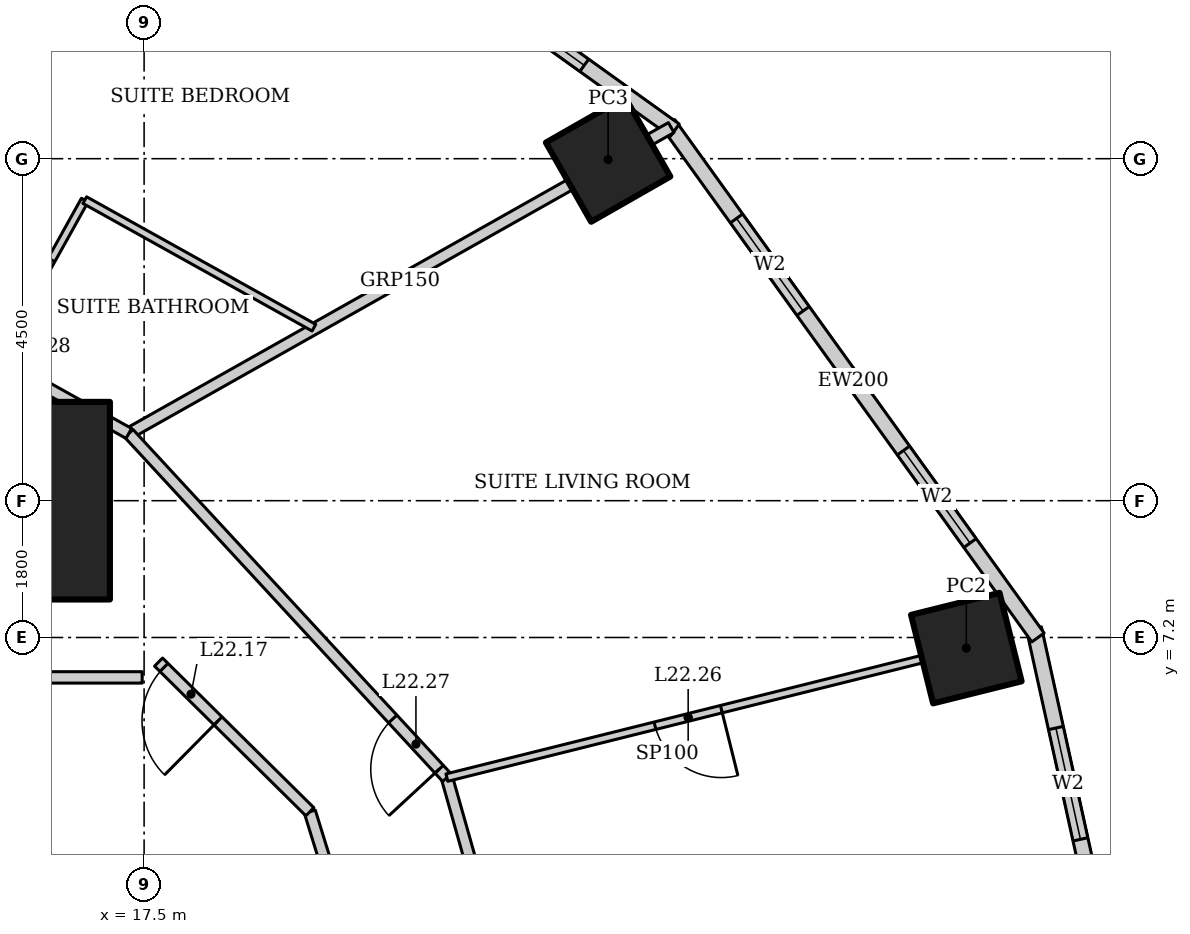
"""IFC4 building model, lengths in metres.
Left out: names, types, materials, properties, quantities, classifications, styles, units other than length and angle.
Written with IfcOpenShell. Run it as: python <this file> out.ifc"""

import sys

from ifc_helpers import new_model, si_unit, direction, frame, frame_2d, origin, origin_2d, place, context, subcontext, project, spatial, rectangle, hollow_rectangle, extrude, element, fill, save


model = new_model("IFC4")
c1 = context("Model", 3, precision=1e-05, world=origin(), true_north=direction((0.0, 1.0)))
c2 = subcontext(c1, "Body", "Model", "MODEL_VIEW")
j1 = project(units=[si_unit("LENGTHUNIT", "METRE"), si_unit("PLANEANGLEUNIT", "RADIAN")], contexts=[c1])
p1 = place(None, origin())
s1 = spatial("IfcSite", under=j1, at=p1, CompositionType="ELEMENT")
p2 = place(p1, origin())
s2 = spatial("IfcBuilding", under=s1, at=p2, CompositionType="ELEMENT")
p3 = place(p2, frame((0.0, 0.0, 94.6)))
s3 = spatial("IfcBuildingStorey", under=s2, at=p3, CompositionType="ELEMENT", Elevation=94.6)
p4 = place(p3, frame((15.75, 9.0, 0.0), z_axis=(0.0, 0.0, 1.0), x_axis=(1.0, 0.0, 0.0)))
e1 = element("IfcColumn", 1, at=p4, inside=s3, PredefinedType="COLUMN", context=c2, shape_type="SweptSolid", body=[
    extrude(hollow_rectangle(XDim=2.6, YDim=2.6, WallThickness=0.13, at=origin_2d()), origin(), (0.0, 0.0, 1.0), 3.6),
])
p5 = place(p3, frame((28.318, 7.06, 0.0), z_axis=(0.0, 0.0, 1.0), x_axis=(0.970295726276, 0.2419218956, 0.0)))
e2 = element("IfcColumn", 2, at=p5, inside=s3, PredefinedType="COLUMN", context=c2, shape_type="SweptSolid", body=[
    extrude(hollow_rectangle(XDim=1.2, YDim=1.2, WallThickness=0.1, at=origin_2d()), origin(), (0.0, 0.0, 1.0), 3.6),
])
p6 = place(p3, frame((23.605, 13.489, 0.0), z_axis=(0.0, 0.0, 1.0), x_axis=(0.86824298017, 0.496139221777, 0.0)))
e3 = element("IfcColumn", 3, at=p6, inside=s3, PredefinedType="COLUMN", context=c2, shape_type="SweptSolid", body=[
    extrude(hollow_rectangle(XDim=1.2, YDim=1.2, WallThickness=0.12, at=origin_2d()), origin(), (0.0, 0.0, 1.0), 3.6),
])
p7 = place(p3, frame((30.835, -0.067, 0.0), z_axis=(0.0, 0.0, 1.0), x_axis=(-0.215238065514, 0.976561608478, 0.0)))
e4 = element("IfcWall", 4, at=p7, inside=s3, PredefinedType="SOLIDWALL", context=c2, shape_type="SweptSolid", body=[
    extrude(rectangle(XDim=7.562, YDim=0.2, at=frame_2d((3.781, 0.0))), origin(), (0.0, 0.0, 1.0), 3.45),
])
p8 = place(p7, frame((1.341, 0.0, 0.5)))
e5 = element("IfcOpeningElement", 5, at=p8, cuts=e4, PredefinedType="OPENING", context=c2, shape_type="SweptSolid", body=[
    extrude(rectangle(XDim=1.5, YDim=2.2, at=frame_2d((0.75, 1.1))), frame((0.0, 0.11, 0.0), z_axis=(0.0, -1.0, 0.0), x_axis=(1.0, 0.0, 0.0)), (0.0, 0.0, 1.0), 0.22),
])
p9 = place(p7, frame((4.722, 0.0, 0.5)))
e6 = element("IfcOpeningElement", 6, at=p9, cuts=e4, PredefinedType="OPENING", context=c2, shape_type="SweptSolid", body=[
    extrude(rectangle(XDim=1.5, YDim=2.2, at=frame_2d((0.75, 1.1))), frame((0.0, 0.11, 0.0), z_axis=(0.0, -1.0, 0.0), x_axis=(1.0, 0.0, 0.0)), (0.0, 0.0, 1.0), 0.22),
])
p10 = place(p3, frame((29.26, 7.2, 0.0), z_axis=(0.0, 0.0, 1.0), x_axis=(-0.583937613703, 0.811798536155, 0.0)))
e7 = element("IfcWall", 7, at=p10, inside=s3, PredefinedType="SOLIDWALL", context=c2, shape_type="SweptSolid", body=[
    extrude(rectangle(XDim=8.323, YDim=0.2, at=frame_2d((4.162, 0.0))), origin(), (0.0, 0.0, 1.0), 3.45),
])
p11 = place(p10, frame((1.531, 0.0, 0.5)))
e8 = element("IfcOpeningElement", 8, at=p11, cuts=e7, PredefinedType="OPENING", context=c2, shape_type="SweptSolid", body=[
    extrude(rectangle(XDim=1.5, YDim=2.2, at=frame_2d((0.75, 1.1))), frame((0.0, 0.11, 0.0), z_axis=(0.0, -1.0, 0.0), x_axis=(1.0, 0.0, 0.0)), (0.0, 0.0, 1.0), 0.22),
])
p12 = place(p10, frame((5.292, 0.0, 0.5)))
e9 = element("IfcOpeningElement", 9, at=p12, cuts=e7, PredefinedType="OPENING", context=c2, shape_type="SweptSolid", body=[
    extrude(rectangle(XDim=1.5, YDim=2.2, at=frame_2d((0.75, 1.1))), frame((0.0, 0.11, 0.0), z_axis=(0.0, -1.0, 0.0), x_axis=(1.0, 0.0, 0.0)), (0.0, 0.0, 1.0), 0.22),
])
p13 = place(p3, frame((24.482, 13.875, 0.0), z_axis=(0.0, 0.0, 1.0), x_axis=(-0.812791321576, 0.582554948112, 0.0)))
e10 = element("IfcWall", 10, at=p13, inside=s3, PredefinedType="SOLIDWALL", context=c2, shape_type="SweptSolid", body=[
    extrude(rectangle(XDim=8.063, YDim=0.2, at=frame_2d((4.032, 0.0))), origin(), (0.0, 0.0, 1.0), 3.45),
])
p14 = place(p13, frame((1.466, 0.0, 0.5)))
e11 = element("IfcOpeningElement", 11, at=p14, cuts=e10, PredefinedType="OPENING", context=c2, shape_type="SweptSolid", body=[
    extrude(rectangle(XDim=1.5, YDim=2.2, at=frame_2d((0.75, 1.1))), frame((0.0, 0.11, 0.0), z_axis=(0.0, -1.0, 0.0), x_axis=(1.0, 0.0, 0.0)), (0.0, 0.0, 1.0), 0.22),
])
p15 = place(p13, frame((5.097, 0.0, 0.5)))
e12 = element("IfcOpeningElement", 12, at=p15, cuts=e10, PredefinedType="OPENING", context=c2, shape_type="SweptSolid", body=[
    extrude(rectangle(XDim=1.5, YDim=2.2, at=frame_2d((0.75, 1.1))), frame((0.0, 0.11, 0.0), z_axis=(0.0, -1.0, 0.0), x_axis=(1.0, 0.0, 0.0)), (0.0, 0.0, 1.0), 0.22),
])
p16 = place(p3, frame((24.435, 13.909, 0.0), z_axis=(0.0, 0.0, 1.0), x_axis=(-0.871075246657, -0.491149584813, 0.0)))
e13 = element("IfcWall", 13, at=p16, inside=s3, PredefinedType="PARTITIONING", context=c2, shape_type="SweptSolid", body=[
    extrude(rectangle(XDim=8.192, YDim=0.15, at=frame_2d((4.096, 0.0))), origin(), (0.0, 0.0, 1.0), 2.693),
])
p17 = place(p3, frame((23.0, 0.0, 0.0), z_axis=(0.0, 0.0, 1.0), x_axis=(-0.272386051236, 0.962188047677, 0.0)))
e14 = element("IfcWall", 14, at=p17, inside=s3, PredefinedType="PARTITIONING", context=c2, shape_type="SweptSolid", body=[
    extrude(rectangle(XDim=5.567, YDim=0.15, at=frame_2d((2.783, 0.0))), origin(), (0.0, 0.0, 1.0), 3.45),
])
p18 = place(p3, frame((21.484, 5.356, 0.0), z_axis=(0.0, 0.0, 1.0), x_axis=(-0.678641806296, 0.734469399463, 0.0)))
e15 = element("IfcWall", 15, at=p18, inside=s3, PredefinedType="PARTITIONING", context=c2, shape_type="SweptSolid", body=[
    extrude(rectangle(XDim=6.166, YDim=0.15, at=frame_2d((3.083, 0.0))), origin(), (0.0, 0.0, 1.0), 3.45),
])
p19 = place(p18, frame((0.15, 0.0, 0.0)))
e16 = element("IfcOpeningElement", 16, at=p19, cuts=e15, PredefinedType="OPENING", context=c2, shape_type="SweptSolid", body=[
    extrude(rectangle(XDim=0.9, YDim=2.1, at=frame_2d((0.45, 1.05))), frame((0.0, 0.085, 0.0), z_axis=(0.0, -1.0, 0.0), x_axis=(1.0, 0.0, 0.0)), (0.0, 0.0, 1.0), 0.17),
])
p20 = place(p3, frame((17.299, 9.885, 0.0), z_axis=(0.0, 0.0, 1.0), x_axis=(-0.873695910579, 0.486472461541, 0.0)))
e17 = element("IfcWall", 17, at=p20, inside=s3, PredefinedType="PARTITIONING", context=c2, shape_type="SweptSolid", body=[
    extrude(rectangle(XDim=5.771, YDim=0.15, at=frame_2d((2.885, 0.0))), origin(), (0.0, 0.0, 1.0), 3.45),
])
p21 = place(p3, frame((20.921, 0.9, 0.0), z_axis=(0.0, 0.0, 1.0), x_axis=(-0.295778570807, 0.955256529447, 0.0)))
e18 = element("IfcWall", 18, at=p21, inside=s3, PredefinedType="PARTITIONING", context=c2, shape_type="SweptSolid", body=[
    extrude(rectangle(XDim=4.195, YDim=0.15, at=frame_2d((2.097, 0.0))), origin(), (0.0, 0.0, 1.0), 3.45),
])
p22 = place(p3, frame((27.833, 6.939, 0.0), z_axis=(0.0, 0.0, 1.0), x_axis=(-0.970295936837, -0.241921051083, 0.0)))
e19 = element("IfcWall", 19, at=p22, inside=s3, PredefinedType="PARTITIONING", context=c2, shape_type="SweptSolid", body=[
    extrude(rectangle(XDim=6.543, YDim=0.1, at=frame_2d((3.272, 0.0))), origin(), (0.0, 0.0, 1.0), 2.332),
])
p23 = place(p22, frame((2.822, 0.0, 0.0)))
e20 = element("IfcOpeningElement", 20, at=p23, cuts=e19, PredefinedType="OPENING", context=c2, shape_type="SweptSolid", body=[
    extrude(rectangle(XDim=0.9, YDim=2.1, at=frame_2d((0.45, 1.05))), frame((0.0, 0.06, 0.0), z_axis=(0.0, -1.0, 0.0), x_axis=(1.0, 0.0, 0.0)), (0.0, 0.0, 1.0), 0.12),
])
p24 = place(p3, frame((15.552, 10.858, 0.0), z_axis=(0.0, 0.0, 1.0), x_axis=(0.486445964861, 0.873710663361, 0.0)))
e21 = element("IfcWall", 21, at=p24, inside=s3, PredefinedType="PARTITIONING", context=c2, shape_type="SweptSolid", body=[
    extrude(rectangle(XDim=2.4, YDim=0.1, at=frame_2d((1.2, 0.0))), origin(), (0.0, 0.0, 1.0), 3.45),
])
p25 = place(p24, frame((0.7, 0.0, 0.0)))
e22 = element("IfcOpeningElement", 22, at=p25, cuts=e21, PredefinedType="OPENING", context=c2, shape_type="SweptSolid", body=[
    extrude(rectangle(XDim=0.8, YDim=2.1, at=frame_2d((0.4, 1.05))), frame((0.0, 0.06, 0.0), z_axis=(0.0, -1.0, 0.0), x_axis=(1.0, 0.0, 0.0)), (0.0, 0.0, 1.0), 0.12),
])
p26 = place(p3, frame((16.719, 12.955, 0.0), z_axis=(0.0, 0.0, 1.0), x_axis=(0.873676251648, -0.486507766953, 0.0)))
e23 = element("IfcWall", 23, at=p26, inside=s3, PredefinedType="PARTITIONING", context=c2, shape_type="SweptSolid", body=[
    extrude(rectangle(XDim=3.45, YDim=0.1, at=frame_2d((1.725, 0.0))), origin(), (0.0, 0.0, 1.0), 3.45),
])
p27 = place(p3, frame((16.944, 17.545, 0.0), z_axis=(0.0, 0.0, 1.0), x_axis=(-0.694677175107, -0.719321640426, 0.0)))
e24 = element("IfcWall", 24, at=p27, inside=s3, PredefinedType="PARTITIONING", context=c2, shape_type="SweptSolid", body=[
    extrude(rectangle(XDim=6.746, YDim=0.1, at=frame_2d((3.373, 0.0))), origin(), (0.0, 0.0, 1.0), 2.528),
])
p28 = place(p27, frame((2.923, 0.0, 0.0)))
e25 = element("IfcOpeningElement", 25, at=p28, cuts=e24, PredefinedType="OPENING", context=c2, shape_type="SweptSolid", body=[
    extrude(rectangle(XDim=0.9, YDim=2.1, at=frame_2d((0.45, 1.05))), frame((0.0, 0.06, 0.0), z_axis=(0.0, -1.0, 0.0), x_axis=(1.0, 0.0, 0.0)), (0.0, 0.0, 1.0), 0.12),
])
p29 = place(p3, frame((19.681, 4.907, 0.0), z_axis=(0.0, 0.0, 1.0), x_axis=(-0.710845937688, 0.70334774676, 0.0)))
e26 = element("IfcWall", 26, at=p29, inside=s3, PredefinedType="PARTITIONING", context=c2, shape_type="SweptSolid", body=[
    extrude(rectangle(XDim=2.8, YDim=0.15, at=frame_2d((1.4, 0.0))), origin(), (0.0, 0.0, 1.0), 3.45),
])
p30 = place(p29, frame((1.7, 0.0, 0.0)))
e27 = element("IfcOpeningElement", 27, at=p30, cuts=e26, PredefinedType="OPENING", context=c2, shape_type="SweptSolid", body=[
    extrude(rectangle(XDim=1.0, YDim=2.1, at=frame_2d((0.5, 1.05))), frame((0.0, 0.085, 0.0), z_axis=(0.0, -1.0, 0.0), x_axis=(1.0, 0.0, 0.0)), (0.0, 0.0, 1.0), 0.17),
])
p31 = place(p3, frame((17.475, 6.675, 0.0), z_axis=(0.0, 0.0, 1.0), x_axis=(-1.0, 0.0, 0.0)))
e28 = element("IfcWall", 28, at=p31, inside=s3, PredefinedType="PARTITIONING", context=c2, shape_type="SweptSolid", body=[
    extrude(rectangle(XDim=3.245, YDim=0.15, at=frame_2d((1.622, 0.0))), origin(), (0.0, 0.0, 1.0), 3.45),
])
p32 = place(p9, origin())
e29 = element("IfcWindow", 29, at=p32, inside=s3, PartitioningType="SINGLE_PANEL", PredefinedType="WINDOW", context=c2, shape_type="SweptSolid", body=[
    extrude(rectangle(XDim=1.5, YDim=2.2, at=frame_2d((0.75, 1.1))), frame((0.0, 0.03, 0.0), z_axis=(0.0, -1.0, 0.0), x_axis=(1.0, 0.0, 0.0)), (0.0, 0.0, 1.0), 0.06),
])
fill(e6, e29)
p33 = place(p11, origin())
e30 = element("IfcWindow", 30, at=p33, inside=s3, PartitioningType="SINGLE_PANEL", PredefinedType="WINDOW", context=c2, shape_type="SweptSolid", body=[
    extrude(rectangle(XDim=1.5, YDim=2.2, at=frame_2d((0.75, 1.1))), frame((0.0, 0.03, 0.0), z_axis=(0.0, -1.0, 0.0), x_axis=(1.0, 0.0, 0.0)), (0.0, 0.0, 1.0), 0.06),
])
fill(e8, e30)
p34 = place(p12, origin())
e31 = element("IfcWindow", 31, at=p34, inside=s3, PartitioningType="SINGLE_PANEL", PredefinedType="WINDOW", context=c2, shape_type="SweptSolid", body=[
    extrude(rectangle(XDim=1.5, YDim=2.2, at=frame_2d((0.75, 1.1))), frame((0.0, 0.03, 0.0), z_axis=(0.0, -1.0, 0.0), x_axis=(1.0, 0.0, 0.0)), (0.0, 0.0, 1.0), 0.06),
])
fill(e9, e31)
p35 = place(p14, origin())
e32 = element("IfcWindow", 32, at=p35, inside=s3, PartitioningType="SINGLE_PANEL", PredefinedType="WINDOW", context=c2, shape_type="SweptSolid", body=[
    extrude(rectangle(XDim=1.5, YDim=2.2, at=frame_2d((0.75, 1.1))), frame((0.0, 0.03, 0.0), z_axis=(0.0, -1.0, 0.0), x_axis=(1.0, 0.0, 0.0)), (0.0, 0.0, 1.0), 0.06),
])
fill(e11, e32)
p36 = place(p30, origin())
e33 = element("IfcDoor", 33, at=p36, inside=s3, OperationType="SINGLE_SWING_LEFT", PredefinedType="DOOR", context=c2, shape_type="SweptSolid", body=[
    extrude(rectangle(XDim=1.0, YDim=2.1, at=frame_2d((0.5, 1.05))), frame((0.0, 0.025, 0.0), z_axis=(0.0, -1.0, 0.0), x_axis=(1.0, 0.0, 0.0)), (0.0, 0.0, 1.0), 0.05),
])
fill(e27, e33)
p37 = place(p23, origin())
e34 = element("IfcDoor", 34, at=p37, inside=s3, OperationType="SINGLE_SWING_LEFT", PredefinedType="DOOR", context=c2, shape_type="SweptSolid", body=[
    extrude(rectangle(XDim=0.9, YDim=2.1, at=frame_2d((0.45, 1.05))), frame((0.0, 0.025, 0.0), z_axis=(0.0, -1.0, 0.0), x_axis=(1.0, 0.0, 0.0)), (0.0, 0.0, 1.0), 0.05),
])
fill(e20, e34)
p38 = place(p19, origin())
e35 = element("IfcDoor", 35, at=p38, inside=s3, OperationType="SINGLE_SWING_LEFT", PredefinedType="DOOR", context=c2, shape_type="SweptSolid", body=[
    extrude(rectangle(XDim=0.9, YDim=2.1, at=frame_2d((0.45, 1.05))), frame((0.0, 0.025, 0.0), z_axis=(0.0, -1.0, 0.0), x_axis=(1.0, 0.0, 0.0)), (0.0, 0.0, 1.0), 0.05),
])
fill(e16, e35)
p39 = place(p25, origin())
e36 = element("IfcDoor", 36, at=p39, inside=s3, OperationType="SINGLE_SWING_LEFT", PredefinedType="DOOR", context=c2, shape_type="SweptSolid", body=[
    extrude(rectangle(XDim=0.8, YDim=2.1, at=frame_2d((0.4, 1.05))), frame((0.0, 0.025, 0.0), z_axis=(0.0, -1.0, 0.0), x_axis=(1.0, 0.0, 0.0)), (0.0, 0.0, 1.0), 0.05),
])
fill(e22, e36)
save(model, sys.argv[1])
